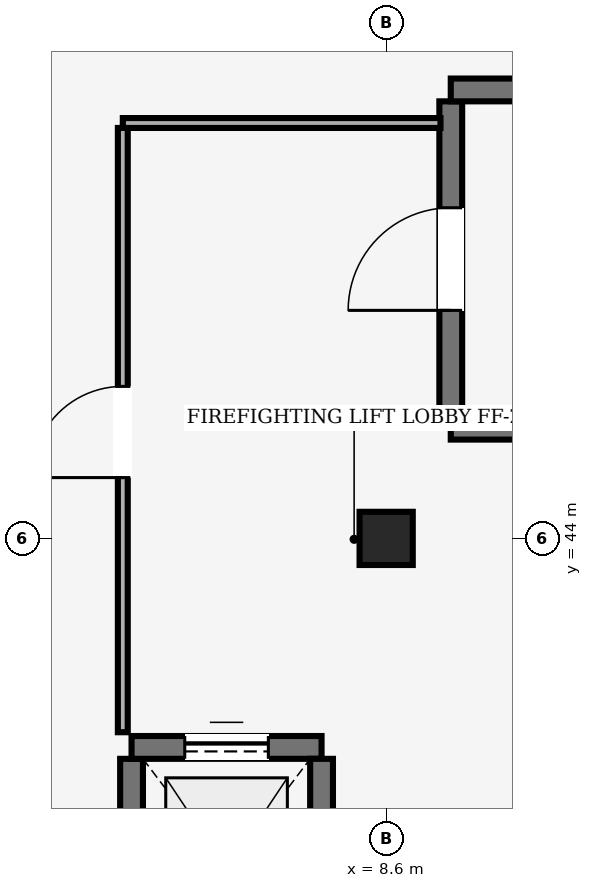
"""IFC4 building model, lengths in metres.
Left out: names, types, materials, properties, quantities, classifications, styles, units other than length and angle.
Written with IfcOpenShell. Run it as: python <this file> out.ifc"""

import sys

from ifc_helpers import new_model, si_unit, direction, frame, frame_2d, origin, origin_2d, place, context, subcontext, project, spatial, rectangle, extrude, element, fill, save


model = new_model("IFC4")
c1 = context("Model", 3, precision=1e-05, world=origin(), true_north=direction((0.0, 1.0)))
c2 = subcontext(c1, "Body", "Model", "MODEL_VIEW")
j1 = project(units=[si_unit("LENGTHUNIT", "METRE"), si_unit("PLANEANGLEUNIT", "RADIAN")], contexts=[c1])
p1 = place(None, origin())
s1 = spatial("IfcSite", under=j1, at=p1, CompositionType="ELEMENT")
p2 = place(p1, origin())
s2 = spatial("IfcBuilding", under=s1, at=p2, CompositionType="ELEMENT")
p3 = place(p2, frame((0.0, 0.0, 8.4)))
s3 = spatial("IfcBuildingStorey", under=s2, at=p3, CompositionType="ELEMENT", Elevation=8.4)
p4 = place(p3, frame((8.6, 44.0, 0.0), z_axis=(0.0, 0.0, 1.0), x_axis=(1.0, 0.0, 0.0)))
e1 = element("IfcColumn", 1, at=p4, inside=s3, PredefinedType="COLUMN", context=c2, shape_type="SweptSolid", body=[
    extrude(rectangle(XDim=0.7, YDim=0.7, at=origin_2d()), origin(), (0.0, 0.0, 1.0), 3.34),
])
p5 = place(p3, frame((19.63, 45.45, 0.0), z_axis=(0.0, 0.0, 1.0), x_axis=(-1.0, 0.0, 0.0)))
e2 = element("IfcWall", 2, at=p5, inside=s3, PredefinedType="SHEAR", context=c2, shape_type="SweptSolid", body=[
    extrude(rectangle(XDim=10.18, YDim=0.3, at=frame_2d((5.09, 0.0))), origin(), (0.0, 0.0, 1.0), 3.34),
])
p6 = place(p3, frame((9.45, 45.6, 0.0), z_axis=(0.0, 0.0, 1.0), x_axis=(0.0, 1.0, 0.0)))
e3 = element("IfcWall", 3, at=p6, inside=s3, PredefinedType="SHEAR", context=c2, shape_type="SweptSolid", body=[
    extrude(rectangle(XDim=4.15, YDim=0.3, at=frame_2d((2.075, 0.0))), origin(), (0.0, 0.0, 1.0), 3.34),
])
p7 = place(p6, frame((1.4, 0.0, 0.0)))
e4 = element("IfcOpeningElement", 4, at=p7, cuts=e3, PredefinedType="OPENING", context=c2, shape_type="SweptSolid", body=[
    extrude(rectangle(XDim=1.35, YDim=2.2, at=frame_2d((0.675, 1.1))), frame((0.0, 0.15, 0.0), z_axis=(0.0, -1.0, 0.0), x_axis=(1.0, 0.0, 0.0)), (0.0, 0.0, 1.0), 0.3),
])
p8 = place(p3, frame((9.45, 49.9, 0.0), z_axis=(0.0, 0.0, 1.0), x_axis=(1.0, 0.0, 0.0)))
e5 = element("IfcWall", 5, at=p8, inside=s3, PredefinedType="SHEAR", context=c2, shape_type="SweptSolid", body=[
    extrude(rectangle(XDim=10.18, YDim=0.3, at=frame_2d((5.09, 0.0))), origin(), (0.0, 0.0, 1.0), 3.34),
])
p9 = place(p3, frame((5.25, 38.2, 0.0), z_axis=(0.0, 0.0, 1.0), x_axis=(0.0, 1.0, 0.0)))
e6 = element("IfcWall", 6, at=p9, inside=s3, PredefinedType="SHEAR", context=c2, shape_type="SweptSolid", body=[
    extrude(rectangle(XDim=2.9, YDim=0.3, at=frame_2d((1.45, 0.0))), origin(), (0.0, 0.0, 1.0), 3.34),
])
p10 = place(p3, frame((5.25, 41.25, 0.0), z_axis=(0.0, 0.0, 1.0), x_axis=(1.0, 0.0, 0.0)))
e7 = element("IfcWall", 7, at=p10, inside=s3, PredefinedType="SHEAR", context=c2, shape_type="SweptSolid", body=[
    extrude(rectangle(XDim=2.5, YDim=0.3, at=frame_2d((1.25, 0.0))), origin(), (0.0, 0.0, 1.0), 3.34),
])
p11 = place(p10, frame((0.7, 0.0, 0.0)))
e8 = element("IfcOpeningElement", 8, at=p11, cuts=e7, PredefinedType="OPENING", context=c2, shape_type="SweptSolid", body=[
    extrude(rectangle(XDim=1.1, YDim=2.1, at=frame_2d((0.55, 1.05))), frame((0.0, 0.15, 0.0), z_axis=(0.0, -1.0, 0.0), x_axis=(1.0, 0.0, 0.0)), (0.0, 0.0, 1.0), 0.3),
])
p12 = place(p3, frame((7.75, 41.1, 0.0), z_axis=(0.0, 0.0, 1.0), x_axis=(0.0, -1.0, 0.0)))
e9 = element("IfcWall", 9, at=p12, inside=s3, PredefinedType="SHEAR", context=c2, shape_type="SweptSolid", body=[
    extrude(rectangle(XDim=2.9, YDim=0.3, at=frame_2d((1.45, 0.0))), origin(), (0.0, 0.0, 1.0), 3.34),
])
p13 = place(p3, frame((5.135, 41.45, 0.0), z_axis=(0.0, 0.0, 1.0), x_axis=(0.0, 1.0, 0.0)))
e10 = element("IfcWall", 10, at=p13, inside=s3, PredefinedType="PARTITIONING", context=c2, shape_type="SweptSolid", body=[
    extrude(rectangle(XDim=7.95, YDim=0.13, at=frame_2d((3.975, 0.0))), origin(), (0.0, 0.0, 1.0), 3.32),
])
p14 = place(p13, frame((3.35, 0.0, 0.0)))
e11 = element("IfcOpeningElement", 11, at=p14, cuts=e10, PredefinedType="OPENING", context=c2, shape_type="SweptSolid", body=[
    extrude(rectangle(XDim=1.2, YDim=2.15, at=frame_2d((0.6, 1.075))), frame((0.0, 0.065, 0.0), z_axis=(0.0, -1.0, 0.0), x_axis=(1.0, 0.0, 0.0)), (0.0, 0.0, 1.0), 0.13),
])
p15 = place(p3, frame((5.135, 49.465, 0.0), z_axis=(0.0, 0.0, 1.0), x_axis=(1.0, 0.0, 0.0)))
e12 = element("IfcWall", 12, at=p15, inside=s3, PredefinedType="PARTITIONING", context=c2, shape_type="SweptSolid", body=[
    extrude(rectangle(XDim=4.18, YDim=0.13, at=frame_2d((2.09, 0.0))), origin(), (0.0, 0.0, 1.0), 3.32),
])
p16 = place(p7, origin())
e13 = element("IfcDoor", 13, at=p16, inside=s3, OperationType="SINGLE_SWING_LEFT", PredefinedType="DOOR", context=c2, shape_type="SweptSolid", body=[
    extrude(rectangle(XDim=1.35, YDim=2.2, at=frame_2d((0.675, 1.1))), frame((0.0, 0.025, 0.0), z_axis=(0.0, -1.0, 0.0), x_axis=(1.0, 0.0, 0.0)), (0.0, 0.0, 1.0), 0.05),
])
fill(e4, e13)
p17 = place(p11, origin())
e14 = element("IfcDoor", 14, at=p17, inside=s3, OperationType="SLIDING_TO_LEFT", PredefinedType="DOOR", context=c2, shape_type="SweptSolid", body=[
    extrude(rectangle(XDim=1.1, YDim=2.1, at=frame_2d((0.55, 1.05))), frame((0.0, 0.025, 0.0), z_axis=(0.0, -1.0, 0.0), x_axis=(1.0, 0.0, 0.0)), (0.0, 0.0, 1.0), 0.05),
])
fill(e8, e14)
p18 = place(p14, origin())
e15 = element("IfcDoor", 15, at=p18, inside=s3, OperationType="SINGLE_SWING_LEFT", PredefinedType="DOOR", context=c2, shape_type="SweptSolid", body=[
    extrude(rectangle(XDim=1.2, YDim=2.15, at=frame_2d((0.6, 1.075))), frame((0.0, 0.025, 0.0), z_axis=(0.0, -1.0, 0.0), x_axis=(1.0, 0.0, 0.0)), (0.0, 0.0, 1.0), 0.05),
])
fill(e11, e15)
save(model, sys.argv[1])
